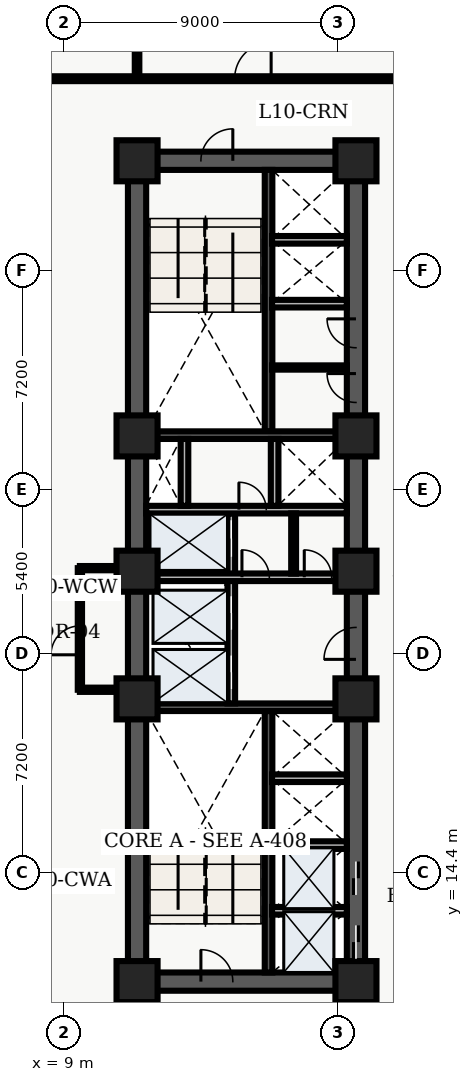
"""IFC4 building model, lengths in metres.
Left out: names, types, materials, properties, quantities, classifications, styles, units other than length and angle.
Written with IfcOpenShell. Run it as: python <this file> out.ifc"""

import sys

from ifc_helpers import new_model, entity, si_unit, converted_unit, direction, frame, origin_with_axes, origin_2d_with_axis, place, context, subcontext, project, spatial, polyline, rectangle, outline, extrude, element, fill, save


model = new_model("IFC4")
c1 = context("Model", 3, precision=1e-05, world=origin_with_axes(), true_north=direction((0.0, 1.0)))
c2 = subcontext(c1, "Body", "Model", "MODEL_VIEW")
j1 = project(units=[si_unit("LENGTHUNIT", "METRE"), converted_unit("PLANEANGLEUNIT", "DEGREE", entity("IfcPlaneAngleMeasure", 0.017), si_unit("PLANEANGLEUNIT", "RADIAN"), dimensions=[0, 0, 0, 0, 0, 0, 0])], contexts=[c1])
p1 = place(None, origin_with_axes())
s1 = spatial("IfcSite", under=j1, at=p1, CompositionType="ELEMENT")
p2 = place(p1, origin_with_axes())
s2 = spatial("IfcBuilding", under=s1, at=p2, CompositionType="ELEMENT")
p3 = place(p2, frame((0.0, 0.0, 44.4), z_axis=(0.0, 0.0, 1.0), x_axis=(1.0, 0.0, 0.0)))
s3 = spatial("IfcBuildingStorey", under=s2, at=p3, CompositionType="ELEMENT", Elevation=44.4)
p4 = place(p3, frame((11.4, 10.8, 0.0), z_axis=(0.0, 0.0, 1.0), x_axis=(0.0, 1.0, 0.0)))
e1 = element("IfcWall", 1, at=p4, inside=s3, PredefinedType="SHEAR", context=c2, shape_type="SweptSolid", body=[
    extrude(outline(polyline([(0.0, -0.3), (27.0, -0.3), (27.0, 0.3), (0.0, 0.3), (0.0, -0.3)])), origin_with_axes(), (0.0, 0.0, 1.0), 3.66),
])
p5 = place(p3, frame((11.4, 10.8, 0.0), z_axis=(0.0, 0.0, 1.0), x_axis=(1.0, 0.0, 0.0)))
e2 = element("IfcWall", 2, at=p5, inside=s3, PredefinedType="SHEAR", context=c2, shape_type="SweptSolid", body=[
    extrude(outline(polyline([(0.0, -0.3), (7.2, -0.3), (7.2, 0.3), (0.0, 0.3), (0.0, -0.3)])), origin_with_axes(), (0.0, 0.0, 1.0), 3.66),
])
p6 = place(p5, frame((2.625, 0.0, 0.0), z_axis=(0.0, 0.0, 1.0), x_axis=(1.0, 0.0, 0.0)))
e3 = element("IfcOpeningElement", 3, at=p6, cuts=e2, PredefinedType="OPENING", context=c2, shape_type="SweptSolid", body=[
    extrude(rectangle(XDim=1.05, YDim=0.62, at=origin_2d_with_axis()), origin_with_axes(), (0.0, 0.0, 1.0), 2.15),
])
p7 = place(p3, frame((11.4, 37.8, 0.0), z_axis=(0.0, 0.0, 1.0), x_axis=(1.0, 0.0, 0.0)))
e4 = element("IfcWall", 4, at=p7, inside=s3, PredefinedType="SHEAR", context=c2, shape_type="SweptSolid", body=[
    extrude(outline(polyline([(0.0, -0.3), (7.2, -0.3), (7.2, 0.3), (0.0, 0.3), (0.0, -0.3)])), origin_with_axes(), (0.0, 0.0, 1.0), 3.66),
])
p8 = place(p7, frame((2.625, 0.0, 0.0), z_axis=(0.0, 0.0, 1.0), x_axis=(1.0, 0.0, 0.0)))
e5 = element("IfcOpeningElement", 5, at=p8, cuts=e4, PredefinedType="OPENING", context=c2, shape_type="SweptSolid", body=[
    extrude(rectangle(XDim=1.05, YDim=0.62, at=origin_2d_with_axis()), origin_with_axes(), (0.0, 0.0, 1.0), 2.15),
])
p9 = place(p3, frame((18.6, 10.8, 0.0), z_axis=(0.0, 0.0, 1.0), x_axis=(0.0, 1.0, 0.0)))
e6 = element("IfcWall", 6, at=p9, inside=s3, PredefinedType="SHEAR", context=c2, shape_type="SweptSolid", body=[
    extrude(outline(polyline([(0.0, -0.3), (13.5, -0.3), (13.5, 0.3), (0.0, 0.3), (0.0, -0.3)])), origin_with_axes(), (0.0, 0.0, 1.0), 3.66),
])
p10 = place(p9, frame((1.3, 0.0, 0.0), z_axis=(0.0, 0.0, 1.0), x_axis=(1.0, 0.0, 0.0)))
e7 = element("IfcOpeningElement", 7, at=p10, cuts=e6, PredefinedType="OPENING", context=c2, shape_type="SweptSolid", body=[
    extrude(rectangle(XDim=1.1, YDim=0.62, at=origin_2d_with_axis()), origin_with_axes(), (0.0, 0.0, 1.0), 2.15),
])
p11 = place(p9, frame((3.4, 0.0, 0.0), z_axis=(0.0, 0.0, 1.0), x_axis=(1.0, 0.0, 0.0)))
e8 = element("IfcOpeningElement", 8, at=p11, cuts=e6, PredefinedType="OPENING", context=c2, shape_type="SweptSolid", body=[
    extrude(rectangle(XDim=1.1, YDim=0.62, at=origin_2d_with_axis()), origin_with_axes(), (0.0, 0.0, 1.0), 2.15),
])
p12 = place(p9, frame((11.125, 0.0, 0.0), z_axis=(0.0, 0.0, 1.0), x_axis=(1.0, 0.0, 0.0)))
e9 = element("IfcOpeningElement", 9, at=p12, cuts=e6, PredefinedType="OPENING", context=c2, shape_type="SweptSolid", body=[
    extrude(rectangle(XDim=1.05, YDim=0.62, at=origin_2d_with_axis()), origin_with_axes(), (0.0, 0.0, 1.0), 2.15),
])
p13 = place(p3, frame((18.6, 24.3, 0.0), z_axis=(0.0, 0.0, 1.0), x_axis=(0.0, 1.0, 0.0)))
e10 = element("IfcWall", 10, at=p13, inside=s3, PredefinedType="SHEAR", context=c2, shape_type="SweptSolid", body=[
    extrude(outline(polyline([(0.0, -0.3), (13.5, -0.3), (13.5, 0.3), (0.0, 0.3), (0.0, -0.3)])), origin_with_axes(), (0.0, 0.0, 1.0), 3.66),
])
p14 = place(p13, frame((6.025, 0.0, 0.0), z_axis=(0.0, 0.0, 1.0), x_axis=(1.0, 0.0, 0.0)))
e11 = element("IfcOpeningElement", 11, at=p14, cuts=e10, PredefinedType="OPENING", context=c2, shape_type="SweptSolid", body=[
    extrude(rectangle(XDim=0.95, YDim=0.62, at=origin_2d_with_axis()), origin_with_axes(), (0.0, 0.0, 1.0), 2.15),
])
p15 = place(p13, frame((7.825, 0.0, 0.0), z_axis=(0.0, 0.0, 1.0), x_axis=(1.0, 0.0, 0.0)))
e12 = element("IfcOpeningElement", 12, at=p15, cuts=e10, PredefinedType="OPENING", context=c2, shape_type="SweptSolid", body=[
    extrude(rectangle(XDim=0.95, YDim=0.62, at=origin_2d_with_axis()), origin_with_axes(), (0.0, 0.0, 1.0), 2.15),
])
p16 = place(p3, frame((15.725, 11.1, 0.0), z_axis=(0.0, 0.0, 1.0), x_axis=(0.0, 1.0, 0.0)))
e13 = element("IfcWall", 13, at=p16, inside=s3, PredefinedType="SHEAR", context=c2, shape_type="SweptSolid", body=[
    extrude(outline(polyline([(0.0, -0.125), (8.6, -0.125), (8.6, 0.125), (0.0, 0.125), (0.0, -0.125)])), origin_with_axes(), (0.0, 0.0, 1.0), 3.66),
])
p17 = place(p3, frame((11.7, 19.825, 0.0), z_axis=(0.0, 0.0, 1.0), x_axis=(1.0, 0.0, 0.0)))
e14 = element("IfcWall", 14, at=p17, inside=s3, PredefinedType="SHEAR", context=c2, shape_type="SweptSolid", body=[
    extrude(outline(polyline([(0.0, -0.125), (6.6, -0.125), (6.6, 0.125), (0.0, 0.125), (0.0, -0.125)])), origin_with_axes(), (0.0, 0.0, 1.0), 3.66),
])
p18 = place(p3, frame((15.725, 28.9, 0.0), z_axis=(0.0, 0.0, 1.0), x_axis=(0.0, 1.0, 0.0)))
e15 = element("IfcWall", 15, at=p18, inside=s3, PredefinedType="SHEAR", context=c2, shape_type="SweptSolid", body=[
    extrude(outline(polyline([(0.0, -0.125), (8.6, -0.125), (8.6, 0.125), (0.0, 0.125), (0.0, -0.125)])), origin_with_axes(), (0.0, 0.0, 1.0), 3.66),
])
p19 = place(p3, frame((11.7, 28.775, 0.0), z_axis=(0.0, 0.0, 1.0), x_axis=(1.0, 0.0, 0.0)))
e16 = element("IfcWall", 16, at=p19, inside=s3, PredefinedType="SHEAR", context=c2, shape_type="SweptSolid", body=[
    extrude(outline(polyline([(0.0, -0.125), (6.6, -0.125), (6.6, 0.125), (0.0, 0.125), (0.0, -0.125)])), origin_with_axes(), (0.0, 0.0, 1.0), 3.66),
])
p20 = place(p3, frame((14.5, 19.95, 0.0), z_axis=(0.0, 0.0, 1.0), x_axis=(0.0, 1.0, 0.0)))
e17 = element("IfcWall", 17, at=p20, inside=s3, PredefinedType="SOLIDWALL", context=c2, shape_type="SweptSolid", body=[
    extrude(outline(polyline([(0.0, -0.125), (6.25, -0.125), (6.25, 0.125), (0.0, 0.125), (0.0, -0.125)])), origin_with_axes(), (0.0, 0.0, 1.0), 2.7),
])
p21 = place(p20, frame((1.025, 0.0, 0.0), z_axis=(0.0, 0.0, 1.0), x_axis=(1.0, 0.0, 0.0)))
e18 = element("IfcOpeningElement", 18, at=p21, cuts=e17, PredefinedType="OPENING", context=c2, shape_type="SweptSolid", body=[
    extrude(rectangle(XDim=1.1, YDim=0.27, at=origin_2d_with_axis()), origin_with_axes(), (0.0, 0.0, 1.0), 2.15),
])
p22 = place(p20, frame((2.975, 0.0, 0.0), z_axis=(0.0, 0.0, 1.0), x_axis=(1.0, 0.0, 0.0)))
e19 = element("IfcOpeningElement", 19, at=p22, cuts=e17, PredefinedType="OPENING", context=c2, shape_type="SweptSolid", body=[
    extrude(rectangle(XDim=1.1, YDim=0.27, at=origin_2d_with_axis()), origin_with_axes(), (0.0, 0.0, 1.0), 2.15),
])
p23 = place(p20, frame((5.425, 0.0, 0.0), z_axis=(0.0, 0.0, 1.0), x_axis=(1.0, 0.0, 0.0)))
e20 = element("IfcOpeningElement", 20, at=p23, cuts=e17, PredefinedType="OPENING", context=c2, shape_type="SweptSolid", body=[
    extrude(rectangle(XDim=1.2, YDim=0.27, at=origin_2d_with_axis()), origin_with_axes(), (0.0, 0.0, 1.0), 2.15),
])
p24 = place(p3, frame((11.7, 24.1, 0.0), z_axis=(0.0, 0.0, 1.0), x_axis=(1.0, 0.0, 0.0)))
e21 = element("IfcWall", 21, at=p24, inside=s3, PredefinedType="SOLIDWALL", context=c2, shape_type="SweptSolid", body=[
    extrude(outline(polyline([(0.0, -0.125), (6.6, -0.125), (6.6, 0.125), (0.0, 0.125), (0.0, -0.125)])), origin_with_axes(), (0.0, 0.0, 1.0), 2.7),
])
p25 = place(p24, frame((3.6, 0.0, 0.0), z_axis=(0.0, 0.0, 1.0), x_axis=(1.0, 0.0, 0.0)))
e22 = element("IfcOpeningElement", 22, at=p25, cuts=e21, PredefinedType="OPENING", context=c2, shape_type="SweptSolid", body=[
    extrude(rectangle(XDim=0.9, YDim=0.27, at=origin_2d_with_axis()), origin_with_axes(), (0.0, 0.0, 1.0), 2.15),
])
p26 = place(p24, frame((5.65, 0.0, 0.0), z_axis=(0.0, 0.0, 1.0), x_axis=(1.0, 0.0, 0.0)))
e23 = element("IfcOpeningElement", 23, at=p26, cuts=e21, PredefinedType="OPENING", context=c2, shape_type="SweptSolid", body=[
    extrude(rectangle(XDim=0.9, YDim=0.27, at=origin_2d_with_axis()), origin_with_axes(), (0.0, 0.0, 1.0), 2.15),
])
p27 = place(p3, frame((11.7, 26.325, 0.0), z_axis=(0.0, 0.0, 1.0), x_axis=(1.0, 0.0, 0.0)))
e24 = element("IfcWall", 24, at=p27, inside=s3, PredefinedType="SOLIDWALL", context=c2, shape_type="SweptSolid", body=[
    extrude(outline(polyline([(0.0, -0.125), (6.6, -0.125), (6.6, 0.125), (0.0, 0.125), (0.0, -0.125)])), origin_with_axes(), (0.0, 0.0, 1.0), 2.7),
])
p28 = place(p27, frame((3.5, 0.0, 0.0), z_axis=(0.0, 0.0, 1.0), x_axis=(1.0, 0.0, 0.0)))
e25 = element("IfcOpeningElement", 25, at=p28, cuts=e24, PredefinedType="OPENING", context=c2, shape_type="SweptSolid", body=[
    extrude(rectangle(XDim=0.9, YDim=0.27, at=origin_2d_with_axis()), origin_with_axes(), (0.0, 0.0, 1.0), 2.15),
])
for number, where, z_axis, x_axis in (
    (26, (12.96, 26.45, 0.0), (0.0, 0.0, 1.0), (0.0, 1.0, 0.0)),
    (27, (15.925, 26.45, 0.0), (0.0, 0.0, 1.0), (0.0, 1.0, 0.0)),
):
    element("IfcWall", number, at=place(p3, frame(where, z_axis=z_axis, x_axis=x_axis)), inside=s3, PredefinedType="SOLIDWALL", context=c2, shape_type="SweptSolid", body=[
        extrude(outline(polyline([(0.0, -0.125), (2.2, -0.125), (2.2, 0.125), (0.0, 0.125), (0.0, -0.125)])), origin_with_axes(), (0.0, 0.0, 1.0), 2.7),
    ])
for number, where, z_axis, x_axis in (
    (28, (11.4, 10.8, 0.0), (0.0, 0.0, 1.0), (1.0, 0.0, 0.0)),
    (29, (11.4, 20.1, 0.0), (0.0, 0.0, 1.0), (1.0, 0.0, 0.0)),
    (30, (11.4, 24.3, 0.0), (0.0, 0.0, 1.0), (1.0, 0.0, 0.0)),
    (31, (11.4, 28.75, 0.0), (0.0, 0.0, 1.0), (1.0, 0.0, 0.0)),
    (32, (11.4, 37.8, 0.0), (0.0, 0.0, 1.0), (1.0, 0.0, 0.0)),
    (33, (18.6, 10.8, 0.0), (0.0, 0.0, 1.0), (1.0, 0.0, 0.0)),
    (34, (18.6, 20.1, 0.0), (0.0, 0.0, 1.0), (1.0, 0.0, 0.0)),
    (35, (18.6, 24.3, 0.0), (0.0, 0.0, 1.0), (1.0, 0.0, 0.0)),
    (36, (18.6, 28.75, 0.0), (0.0, 0.0, 1.0), (1.0, 0.0, 0.0)),
    (37, (18.6, 37.8, 0.0), (0.0, 0.0, 1.0), (1.0, 0.0, 0.0)),
):
    element("IfcColumn", number, at=place(p3, frame(where, z_axis=z_axis, x_axis=x_axis)), inside=s3, PredefinedType="COLUMN", context=c2, shape_type="SweptSolid", body=[
        extrude(rectangle(XDim=1.35, YDim=1.35, at=origin_2d_with_axis()), origin_with_axes(), (0.0, 0.0, 1.0), 3.9),
    ])
p29 = place(p3, frame((16.55, 24.22, 0.0), z_axis=(0.0, 0.0, 1.0), x_axis=(0.0, 1.0, 0.0)))
e38 = element("IfcWall", 38, at=p29, inside=s3, PredefinedType="PARTITIONING", context=c2, shape_type="SweptSolid", body=[
    extrude(outline(polyline([(0.0, -0.08), (1.98, -0.08), (1.98, 0.08), (0.0, 0.08), (0.0, -0.08)])), origin_with_axes(), (0.0, 0.0, 1.0), 2.7),
])
for number, where, z_axis, x_axis in (
    (39, (15.84, 13.13, 0.0), (0.0, 0.0, 1.0), (1.0, 0.0, 0.0)),
    (40, (15.84, 15.29, 0.0), (0.0, 0.0, 1.0), (1.0, 0.0, 0.0)),
    (41, (15.84, 17.49, 0.0), (0.0, 0.0, 1.0), (1.0, 0.0, 0.0)),
    (42, (15.84, 33.1, 0.0), (0.0, 0.0, 1.0), (1.0, 0.0, 0.0)),
    (43, (15.84, 35.2, 0.0), (0.0, 0.0, 1.0), (1.0, 0.0, 0.0)),
):
    element("IfcWall", number, at=place(p3, frame(where, z_axis=z_axis, x_axis=x_axis)), inside=s3, PredefinedType="SOLIDWALL", context=c2, shape_type="SweptSolid", body=[
        extrude(outline(polyline([(0.0, -0.125), (2.46, -0.125), (2.46, 0.125), (0.0, 0.125), (0.0, -0.125)])), origin_with_axes(), (0.0, 0.0, 1.0), 2.7),
    ])
p30 = place(p3, frame((15.84, 31.0, 0.0), z_axis=(0.0, 0.0, 1.0), x_axis=(1.0, 0.0, 0.0)))
e44 = element("IfcWall", 44, at=p30, inside=s3, PredefinedType="PARTITIONING", context=c2, shape_type="SweptSolid", body=[
    extrude(outline(polyline([(0.0, -0.07), (2.46, -0.07), (2.46, 0.07), (0.0, 0.07), (0.0, -0.07)])), origin_with_axes(), (0.0, 0.0, 1.0), 2.7),
])
p31 = place(p3, frame((9.52, 20.4, 0.0), z_axis=(0.0, 0.0, 1.0), x_axis=(0.0, 1.0, 0.0)))
e45 = element("IfcWall", 45, at=p31, inside=s3, PredefinedType="PARTITIONING", context=c2, shape_type="SweptSolid", body=[
    extrude(outline(polyline([(0.0, -0.07), (4.0, -0.07), (4.0, 0.07), (0.0, 0.07), (0.0, -0.07)])), origin_with_axes(), (0.0, 0.0, 1.0), 2.7),
])
p32 = place(p31, frame((1.625, 0.0, 0.0), z_axis=(0.0, 0.0, 1.0), x_axis=(1.0, 0.0, 0.0)))
e46 = element("IfcOpeningElement", 46, at=p32, cuts=e45, PredefinedType="OPENING", context=c2, shape_type="SweptSolid", body=[
    extrude(rectangle(XDim=0.95, YDim=0.16, at=origin_2d_with_axis()), origin_with_axes(), (0.0, 0.0, 1.0), 2.15),
])
for number, where, z_axis, x_axis in (
    (47, (9.52, 20.4, 0.0), (0.0, 0.0, 1.0), (1.0, 0.0, 0.0)),
    (48, (9.52, 24.4, 0.0), (0.0, 0.0, 1.0), (1.0, 0.0, 0.0)),
):
    element("IfcWall", number, at=place(p3, frame(where, z_axis=z_axis, x_axis=x_axis)), inside=s3, PredefinedType="PARTITIONING", context=c2, shape_type="SweptSolid", body=[
        extrude(outline(polyline([(0.0, -0.07), (1.58, -0.07), (1.58, 0.07), (0.0, 0.07), (0.0, -0.07)])), origin_with_axes(), (0.0, 0.0, 1.0), 2.7),
    ])
p33 = place(p3, frame((2.6, 40.5, 0.0), z_axis=(0.0, 0.0, 1.0), x_axis=(1.0, 0.0, 0.0)))
e49 = element("IfcWall", 49, at=p33, inside=s3, PredefinedType="PARTITIONING", context=c2, shape_type="SweptSolid", body=[
    extrude(outline(polyline([(0.0, -0.08), (18.65, -0.08), (18.65, 0.08), (0.0, 0.08), (0.0, -0.08)])), origin_with_axes(), (0.0, 0.0, 1.0), 2.7),
])
p34 = place(p33, frame((5.275, 0.0, 0.0), z_axis=(0.0, 0.0, 1.0), x_axis=(1.0, 0.0, 0.0)))
e50 = element("IfcOpeningElement", 50, at=p34, cuts=e49, PredefinedType="OPENING", context=c2, shape_type="SweptSolid", body=[
    extrude(rectangle(XDim=1.0, YDim=0.18, at=origin_2d_with_axis()), origin_with_axes(), (0.0, 0.0, 1.0), 2.15),
])
p35 = place(p33, frame((12.61, 0.0, 0.0), z_axis=(0.0, 0.0, 1.0), x_axis=(1.0, 0.0, 0.0)))
e51 = element("IfcOpeningElement", 51, at=p35, cuts=e49, PredefinedType="OPENING", context=c2, shape_type="SweptSolid", body=[
    extrude(rectangle(XDim=1.2, YDim=0.18, at=origin_2d_with_axis()), origin_with_axes(), (0.0, 0.0, 1.0), 2.2),
])
p36 = place(p3, frame((11.4, 40.6, 0.0), z_axis=(0.0, 0.0, 1.0), x_axis=(0.0, 1.0, 0.0)))
e52 = element("IfcWall", 52, at=p36, inside=s3, PredefinedType="PARTITIONING", context=c2, shape_type="SweptSolid", body=[
    extrude(outline(polyline([(0.0, -0.075), (7.64, -0.075), (7.64, 0.075), (0.0, 0.075), (0.0, -0.075)])), origin_with_axes(), (0.0, 0.0, 1.0), 2.7),
])
p37 = place(p9, frame((1.3, 0.0, 0.0), z_axis=(0.0, 0.0, 1.0), x_axis=(1.0, 0.0, 0.0)))
e53 = element("IfcDoor", 53, at=p37, inside=s3, OperationType="SLIDING_TO_LEFT", PredefinedType="DOOR", context=c2, shape_type="SweptSolid", body=[
    extrude(rectangle(XDim=1.1, YDim=0.09, at=origin_2d_with_axis()), origin_with_axes(), (0.0, 0.0, 1.0), 2.15),
])
fill(e7, e53)
p38 = place(p9, frame((3.4, 0.0, 0.0), z_axis=(0.0, 0.0, 1.0), x_axis=(1.0, 0.0, 0.0)))
e54 = element("IfcDoor", 54, at=p38, inside=s3, OperationType="SLIDING_TO_RIGHT", PredefinedType="DOOR", context=c2, shape_type="SweptSolid", body=[
    extrude(rectangle(XDim=1.1, YDim=0.09, at=origin_2d_with_axis()), origin_with_axes(), (0.0, 0.0, 1.0), 2.15),
])
fill(e8, e54)
p39 = place(p20, frame((1.025, 0.0, 0.0), z_axis=(0.0, 0.0, 1.0), x_axis=(1.0, 0.0, 0.0)))
e55 = element("IfcDoor", 55, at=p39, inside=s3, OperationType="SLIDING_TO_LEFT", PredefinedType="DOOR", context=c2, shape_type="SweptSolid", body=[
    extrude(rectangle(XDim=1.1, YDim=0.09, at=origin_2d_with_axis()), origin_with_axes(), (0.0, 0.0, 1.0), 2.15),
])
fill(e18, e55)
p40 = place(p20, frame((2.975, 0.0, 0.0), z_axis=(0.0, 0.0, 1.0), x_axis=(1.0, 0.0, 0.0)))
e56 = element("IfcDoor", 56, at=p40, inside=s3, OperationType="SLIDING_TO_RIGHT", PredefinedType="DOOR", context=c2, shape_type="SweptSolid", body=[
    extrude(rectangle(XDim=1.1, YDim=0.09, at=origin_2d_with_axis()), origin_with_axes(), (0.0, 0.0, 1.0), 2.15),
])
fill(e19, e56)
p41 = place(p20, frame((5.425, 0.0, 0.0), z_axis=(0.0, 0.0, 1.0), x_axis=(1.0, 0.0, 0.0)))
e57 = element("IfcDoor", 57, at=p41, inside=s3, OperationType="DOUBLE_DOOR_SLIDING", PredefinedType="DOOR", context=c2, shape_type="SweptSolid", body=[
    extrude(rectangle(XDim=1.2, YDim=0.09, at=origin_2d_with_axis()), origin_with_axes(), (0.0, 0.0, 1.0), 2.15),
])
fill(e20, e57)
p42 = place(p5, frame((2.625, 0.0, 0.0), z_axis=(0.0, 0.0, 1.0), x_axis=(1.0, 0.0, 0.0)))
e58 = element("IfcDoor", 58, at=p42, inside=s3, OperationType="SINGLE_SWING_LEFT", PredefinedType="DOOR", context=c2, shape_type="SweptSolid", body=[
    extrude(rectangle(XDim=1.05, YDim=0.09, at=origin_2d_with_axis()), origin_with_axes(), (0.0, 0.0, 1.0), 2.15),
])
fill(e3, e58)
p43 = place(p7, frame((2.625, 0.0, 0.0), z_axis=(0.0, 0.0, 1.0), x_axis=(1.0, 0.0, 0.0)))
e59 = element("IfcDoor", 59, at=p43, inside=s3, OperationType="SINGLE_SWING_RIGHT", PredefinedType="DOOR", context=c2, shape_type="SweptSolid", body=[
    extrude(rectangle(XDim=1.05, YDim=0.09, at=origin_2d_with_axis()), origin_with_axes(), (0.0, 0.0, 1.0), 2.15),
])
fill(e5, e59)
p44 = place(p9, frame((11.125, 0.0, 0.0), z_axis=(0.0, 0.0, 1.0), x_axis=(1.0, 0.0, 0.0)))
e60 = element("IfcDoor", 60, at=p44, inside=s3, OperationType="SINGLE_SWING_LEFT", PredefinedType="DOOR", context=c2, shape_type="SweptSolid", body=[
    extrude(rectangle(XDim=1.05, YDim=0.09, at=origin_2d_with_axis()), origin_with_axes(), (0.0, 0.0, 1.0), 2.15),
])
fill(e9, e60)
p45 = place(p24, frame((3.6, 0.0, 0.0), z_axis=(0.0, 0.0, 1.0), x_axis=(1.0, 0.0, 0.0)))
e61 = element("IfcDoor", 61, at=p45, inside=s3, OperationType="SINGLE_SWING_LEFT", PredefinedType="DOOR", context=c2, shape_type="SweptSolid", body=[
    extrude(rectangle(XDim=0.9, YDim=0.09, at=origin_2d_with_axis()), origin_with_axes(), (0.0, 0.0, 1.0), 2.15),
])
fill(e22, e61)
p46 = place(p24, frame((5.65, 0.0, 0.0), z_axis=(0.0, 0.0, 1.0), x_axis=(1.0, 0.0, 0.0)))
e62 = element("IfcDoor", 62, at=p46, inside=s3, OperationType="SINGLE_SWING_LEFT", PredefinedType="DOOR", context=c2, shape_type="SweptSolid", body=[
    extrude(rectangle(XDim=0.9, YDim=0.09, at=origin_2d_with_axis()), origin_with_axes(), (0.0, 0.0, 1.0), 2.15),
])
fill(e23, e62)
p47 = place(p27, frame((3.5, 0.0, 0.0), z_axis=(0.0, 0.0, 1.0), x_axis=(1.0, 0.0, 0.0)))
e63 = element("IfcDoor", 63, at=p47, inside=s3, OperationType="SINGLE_SWING_LEFT", PredefinedType="DOOR", context=c2, shape_type="SweptSolid", body=[
    extrude(rectangle(XDim=0.9, YDim=0.09, at=origin_2d_with_axis()), origin_with_axes(), (0.0, 0.0, 1.0), 2.15),
])
fill(e25, e63)
p48 = place(p13, frame((6.025, 0.0, 0.0), z_axis=(0.0, 0.0, 1.0), x_axis=(1.0, 0.0, 0.0)))
e64 = element("IfcDoor", 64, at=p48, inside=s3, OperationType="SINGLE_SWING_RIGHT", PredefinedType="DOOR", context=c2, shape_type="SweptSolid", body=[
    extrude(rectangle(XDim=0.95, YDim=0.09, at=origin_2d_with_axis()), origin_with_axes(), (0.0, 0.0, 1.0), 2.15),
])
fill(e11, e64)
p49 = place(p13, frame((7.825, 0.0, 0.0), z_axis=(0.0, 0.0, 1.0), x_axis=(1.0, 0.0, 0.0)))
e65 = element("IfcDoor", 65, at=p49, inside=s3, OperationType="SINGLE_SWING_RIGHT", PredefinedType="DOOR", context=c2, shape_type="SweptSolid", body=[
    extrude(rectangle(XDim=0.95, YDim=0.09, at=origin_2d_with_axis()), origin_with_axes(), (0.0, 0.0, 1.0), 2.15),
])
fill(e12, e65)
p50 = place(p31, frame((1.625, 0.0, 0.0), z_axis=(0.0, 0.0, 1.0), x_axis=(1.0, 0.0, 0.0)))
e66 = element("IfcDoor", 66, at=p50, inside=s3, OperationType="SINGLE_SWING_LEFT", PredefinedType="DOOR", context=c2, shape_type="SweptSolid", body=[
    extrude(rectangle(XDim=0.95, YDim=0.084, at=origin_2d_with_axis()), origin_with_axes(), (0.0, 0.0, 1.0), 2.15),
])
fill(e46, e66)
p51 = place(p33, frame((12.61, 0.0, 0.0), z_axis=(0.0, 0.0, 1.0), x_axis=(1.0, 0.0, 0.0)))
e67 = element("IfcDoor", 67, at=p51, inside=s3, OperationType="SINGLE_SWING_RIGHT", PredefinedType="DOOR", context=c2, shape_type="SweptSolid", body=[
    extrude(rectangle(XDim=1.2, YDim=0.09, at=origin_2d_with_axis()), origin_with_axes(), (0.0, 0.0, 1.0), 2.2),
])
fill(e51, e67)
save(model, sys.argv[1])
